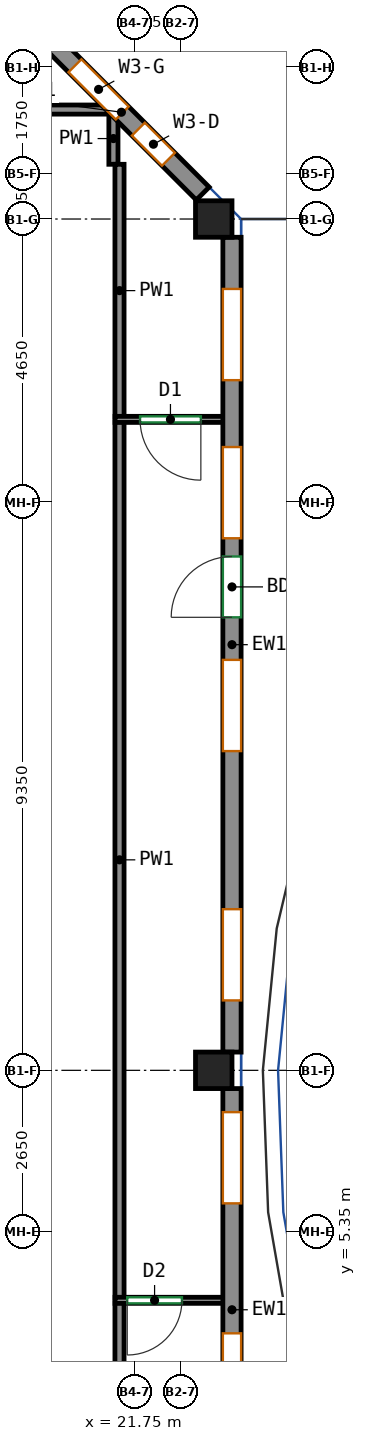
"""IFC4 building model, lengths in metres.
Left out: names, types, materials, properties, quantities, classifications, styles, units other than length and angle.
Written with IfcOpenShell. Run it as: python <this file> out.ifc"""

import sys

from ifc_helpers import new_model, si_unit, direction, frame, frame_2d, origin, origin_2d, place, context, subcontext, project, spatial, rectangle, extrude, source, transform, mapped, element, fill, save


model = new_model("IFC4")
c1 = context("Model", 3, precision=1e-05, world=origin(), true_north=direction((0.0, 1.0)))
c2 = subcontext(c1, "Body", "Model", "MODEL_VIEW")
j1 = project(units=[si_unit("LENGTHUNIT", "METRE"), si_unit("PLANEANGLEUNIT", "RADIAN")], contexts=[c1])
p1 = place(None, origin())
s1 = spatial("IfcSite", under=j1, at=p1, CompositionType="ELEMENT")
p2 = place(p1, origin())
s2 = spatial("IfcBuilding", under=s1, at=p2, CompositionType="ELEMENT")
p3 = place(p2, frame((0.0, 0.0, 315.4)))
s3 = spatial("IfcBuildingStorey", under=s2, at=p3, CompositionType="ELEMENT", Elevation=315.4)
m1 = source(origin(), c2, "Body", "SweptSolid", [
    extrude(rectangle(XDim=0.6, YDim=0.6, at=origin_2d()), origin(), (0.0, 0.0, 1.0), 3.0),
])
for number, where, z_axis, x_axis in (
    (1, (23.05, 8.0, 0.0), (0.0, 0.0, 1.0), (1.0, 0.0, 0.0)),
    (2, (23.05, 22.0, 0.0), (0.0, 0.0, 1.0), (1.0, 0.0, 0.0)),
):
    element("IfcColumn", number, at=place(p3, frame(where, z_axis=z_axis, x_axis=x_axis)), inside=s3, PredefinedType="COLUMN", context=c2, shape_type="MappedRepresentation", body=[
        mapped(m1, transform((0.0, 0.0, 0.0))),
    ])
m2 = source(origin(), c2, "Body", "SweptSolid", [
    extrude(rectangle(XDim=7.275, YDim=0.3, at=frame_2d((3.637, 0.0))), origin(), (0.0, 0.0, 1.0), 3.0),
])
p4 = place(p3, frame((23.35, 0.425, 0.0), z_axis=(0.0, 0.0, 1.0), x_axis=(0.0, 1.0, 0.0)))
e3 = element("IfcWall", 3, at=p4, inside=s3, PredefinedType="SOLIDWALL", context=c2, shape_type="MappedRepresentation", body=[
    mapped(m2, transform((0.0, 0.0, 0.0))),
])
p5 = place(p4, frame((1.75, 0.0, 0.8)))
e4 = element("IfcOpeningElement", 4, at=p5, cuts=e3, PredefinedType="OPENING", context=c2, shape_type="SweptSolid", body=[
    extrude(rectangle(XDim=1.5, YDim=2.05, at=frame_2d((0.75, 1.025))), frame((0.0, 0.16, 0.0), z_axis=(0.0, -1.0, 0.0), x_axis=(1.0, 0.0, 0.0)), (0.0, 0.0, 1.0), 0.32),
])
p6 = place(p4, frame((0.45, 0.0, 0.0)))
e5 = element("IfcOpeningElement", 5, at=p6, cuts=e3, PredefinedType="OPENING", context=c2, shape_type="SweptSolid", body=[
    extrude(rectangle(XDim=1.0, YDim=2.1, at=frame_2d((0.5, 1.05))), frame((0.0, 0.16, 0.0), z_axis=(0.0, -1.0, 0.0), x_axis=(1.0, 0.0, 0.0)), (0.0, 0.0, 1.0), 0.32),
])
p7 = place(p4, frame((5.387, 0.0, 0.8)))
e6 = element("IfcOpeningElement", 6, at=p7, cuts=e3, PredefinedType="OPENING", context=c2, shape_type="SweptSolid", body=[
    extrude(rectangle(XDim=1.5, YDim=2.05, at=frame_2d((0.75, 1.025))), frame((0.0, 0.16, 0.0), z_axis=(0.0, -1.0, 0.0), x_axis=(1.0, 0.0, 0.0)), (0.0, 0.0, 1.0), 0.32),
])
m3 = source(origin(), c2, "Body", "SweptSolid", [
    extrude(rectangle(XDim=13.4, YDim=0.3, at=frame_2d((6.7, 0.0))), origin(), (0.0, 0.0, 1.0), 3.0),
])
p8 = place(p3, frame((23.35, 8.3, 0.0), z_axis=(0.0, 0.0, 1.0), x_axis=(0.0, 1.0, 0.0)))
e7 = element("IfcWall", 7, at=p8, inside=s3, PredefinedType="SOLIDWALL", context=c2, shape_type="MappedRepresentation", body=[
    mapped(m3, transform((0.0, 0.0, 0.0))),
])
p9 = place(p8, frame((0.85, 0.0, 0.8)))
e8 = element("IfcOpeningElement", 8, at=p9, cuts=e7, PredefinedType="OPENING", context=c2, shape_type="SweptSolid", body=[
    extrude(rectangle(XDim=1.5, YDim=2.05, at=frame_2d((0.75, 1.025))), frame((0.0, 0.16, 0.0), z_axis=(0.0, -1.0, 0.0), x_axis=(1.0, 0.0, 0.0)), (0.0, 0.0, 1.0), 0.32),
])
p10 = place(p8, frame((4.95, 0.0, 0.8)))
e9 = element("IfcOpeningElement", 9, at=p10, cuts=e7, PredefinedType="OPENING", context=c2, shape_type="SweptSolid", body=[
    extrude(rectangle(XDim=1.5, YDim=2.05, at=frame_2d((0.75, 1.025))), frame((0.0, 0.16, 0.0), z_axis=(0.0, -1.0, 0.0), x_axis=(1.0, 0.0, 0.0)), (0.0, 0.0, 1.0), 0.32),
])
p11 = place(p8, frame((8.45, 0.0, 0.8)))
e10 = element("IfcOpeningElement", 10, at=p11, cuts=e7, PredefinedType="OPENING", context=c2, shape_type="SweptSolid", body=[
    extrude(rectangle(XDim=1.5, YDim=2.05, at=frame_2d((0.75, 1.025))), frame((0.0, 0.16, 0.0), z_axis=(0.0, -1.0, 0.0), x_axis=(1.0, 0.0, 0.0)), (0.0, 0.0, 1.0), 0.32),
])
p12 = place(p8, frame((7.15, 0.0, 0.0)))
e11 = element("IfcOpeningElement", 11, at=p12, cuts=e7, PredefinedType="OPENING", context=c2, shape_type="SweptSolid", body=[
    extrude(rectangle(XDim=1.0, YDim=2.1, at=frame_2d((0.5, 1.05))), frame((0.0, 0.16, 0.0), z_axis=(0.0, -1.0, 0.0), x_axis=(1.0, 0.0, 0.0)), (0.0, 0.0, 1.0), 0.32),
])
p13 = place(p8, frame((11.05, 0.0, 0.8)))
e12 = element("IfcOpeningElement", 12, at=p13, cuts=e7, PredefinedType="OPENING", context=c2, shape_type="SweptSolid", body=[
    extrude(rectangle(XDim=1.5, YDim=2.05, at=frame_2d((0.75, 1.025))), frame((0.0, 0.16, 0.0), z_axis=(0.0, -1.0, 0.0), x_axis=(1.0, 0.0, 0.0)), (0.0, 0.0, 1.0), 0.32),
])
m4 = source(origin(), c2, "Body", "SweptSolid", [
    extrude(rectangle(XDim=3.783, YDim=0.3, at=frame_2d((1.892, 0.0))), origin(), (0.0, 0.0, 1.0), 3.0),
])
p14 = place(p3, frame((22.869, 22.419, 0.0), z_axis=(0.0, 0.0, 1.0), x_axis=(-0.707106781187, 0.707106781187, 0.0)))
e13 = element("IfcWall", 13, at=p14, inside=s3, PredefinedType="SOLIDWALL", context=c2, shape_type="MappedRepresentation", body=[
    mapped(m4, transform((0.0, 0.0, 0.0))),
])
p15 = place(p14, frame((0.797, 0.0, 0.8)))
e14 = element("IfcOpeningElement", 14, at=p15, cuts=e13, PredefinedType="OPENING", context=c2, shape_type="SweptSolid", body=[
    extrude(rectangle(XDim=0.7, YDim=2.05, at=frame_2d((0.35, 1.025))), frame((0.0, 0.16, 0.0), z_axis=(0.0, -1.0, 0.0), x_axis=(1.0, 0.0, 0.0)), (0.0, 0.0, 1.0), 0.32),
])
p16 = place(p14, frame((1.872, 0.0, 0.8)))
e15 = element("IfcOpeningElement", 15, at=p16, cuts=e13, PredefinedType="OPENING", context=c2, shape_type="SweptSolid", body=[
    extrude(rectangle(XDim=1.1, YDim=2.05, at=frame_2d((0.55, 1.025))), frame((0.0, 0.16, 0.0), z_axis=(0.0, -1.0, 0.0), x_axis=(1.0, 0.0, 0.0)), (0.0, 0.0, 1.0), 0.32),
])
p17 = place(p3, frame((21.5, -2.671, 0.0), z_axis=(0.0, 0.0, 1.0), x_axis=(0.0, 1.0, 0.0)))
e16 = element("IfcWall", 16, at=p17, inside=s3, PredefinedType="PARTITIONING", context=c2, shape_type="SweptSolid", body=[
    extrude(rectangle(XDim=6.849, YDim=0.15, at=frame_2d((3.424, 0.0))), origin(), (0.0, 0.0, 1.0), 3.0),
])
p18 = place(p3, frame((21.5, 4.258, 0.0), z_axis=(0.0, 0.0, 1.0), x_axis=(0.0, 1.0, 0.0)))
e17 = element("IfcWall", 17, at=p18, inside=s3, PredefinedType="PARTITIONING", context=c2, shape_type="SweptSolid", body=[
    extrude(rectangle(XDim=14.407, YDim=0.15, at=frame_2d((7.204, 0.0))), origin(), (0.0, 0.0, 1.0), 3.0),
])
p19 = place(p3, frame((21.4, 22.9, 0.0), z_axis=(0.0, 0.0, 1.0), x_axis=(0.0, 1.0, 0.0)))
e18 = element("IfcWall", 18, at=p19, inside=s3, PredefinedType="PARTITIONING", context=c2, shape_type="SweptSolid", body=[
    extrude(rectangle(XDim=0.846, YDim=0.15, at=frame_2d((0.423, 0.0))), origin(), (0.0, 0.0, 1.0), 3.0),
])
p20 = place(p3, frame((21.5, 18.745, 0.0), z_axis=(0.0, 0.0, 1.0), x_axis=(0.0, 1.0, 0.0)))
e19 = element("IfcWall", 19, at=p20, inside=s3, PredefinedType="PARTITIONING", context=c2, shape_type="SweptSolid", body=[
    extrude(rectangle(XDim=4.155, YDim=0.15, at=frame_2d((2.077, 0.0))), origin(), (0.0, 0.0, 1.0), 3.0),
])
p21 = place(p3, frame((-19.675, 23.8, 0.0), z_axis=(0.0, 0.0, 1.0), x_axis=(1.0, 0.0, 0.0)))
e20 = element("IfcWall", 20, at=p21, inside=s3, PredefinedType="PARTITIONING", context=c2, shape_type="SweptSolid", body=[
    extrude(rectangle(XDim=41.021, YDim=0.15, at=frame_2d((20.51, 0.0))), origin(), (0.0, 0.0, 1.0), 3.0),
])
p22 = place(p21, frame((5.01, 0.0, 0.0)))
e21 = element("IfcOpeningElement", 21, at=p22, cuts=e20, PredefinedType="OPENING", context=c2, shape_type="SweptSolid", body=[
    extrude(rectangle(XDim=0.9, YDim=2.1, at=frame_2d((0.45, 1.05))), frame((0.0, 0.085, 0.0), z_axis=(0.0, -1.0, 0.0), x_axis=(1.0, 0.0, 0.0)), (0.0, 0.0, 1.0), 0.17),
])
p23 = place(p21, frame((26.417, 0.0, 0.0)))
e22 = element("IfcOpeningElement", 22, at=p23, cuts=e20, PredefinedType="OPENING", context=c2, shape_type="SweptSolid", body=[
    extrude(rectangle(XDim=0.9, YDim=2.1, at=frame_2d((0.45, 1.05))), frame((0.0, 0.085, 0.0), z_axis=(0.0, -1.0, 0.0), x_axis=(1.0, 0.0, 0.0)), (0.0, 0.0, 1.0), 0.17),
])
p24 = place(p3, frame((23.25, 4.218, 0.0), z_axis=(0.0, 0.0, 1.0), x_axis=(-1.0, 0.0, 0.0)))
e23 = element("IfcWall", 23, at=p24, inside=s3, PredefinedType="PARTITIONING", context=c2, shape_type="SweptSolid", body=[
    extrude(rectangle(XDim=1.823, YDim=0.1, at=frame_2d((0.912, 0.0))), origin(), (0.0, 0.0, 1.0), 3.0),
])
p25 = place(p24, frame((0.723, 0.0, 0.0)))
e24 = element("IfcOpeningElement", 24, at=p25, cuts=e23, PredefinedType="OPENING", context=c2, shape_type="SweptSolid", body=[
    extrude(rectangle(XDim=0.9, YDim=2.1, at=frame_2d((0.45, 1.05))), frame((0.0, 0.06, 0.0), z_axis=(0.0, -1.0, 0.0), x_axis=(1.0, 0.0, 0.0)), (0.0, 0.0, 1.0), 0.12),
])
p26 = place(p3, frame((23.25, 18.705, 0.0), z_axis=(0.0, 0.0, 1.0), x_axis=(-1.0, 0.0, 0.0)))
e25 = element("IfcWall", 25, at=p26, inside=s3, PredefinedType="PARTITIONING", context=c2, shape_type="SweptSolid", body=[
    extrude(rectangle(XDim=1.823, YDim=0.1, at=frame_2d((0.912, 0.0))), origin(), (0.0, 0.0, 1.0), 3.0),
])
p27 = place(p26, frame((0.412, 0.0, 0.0)))
e26 = element("IfcOpeningElement", 26, at=p27, cuts=e25, PredefinedType="OPENING", context=c2, shape_type="SweptSolid", body=[
    extrude(rectangle(XDim=1.0, YDim=2.1, at=frame_2d((0.5, 1.05))), frame((0.0, 0.06, 0.0), z_axis=(0.0, -1.0, 0.0), x_axis=(1.0, 0.0, 0.0)), (0.0, 0.0, 1.0), 0.12),
])
p28 = place(p5, origin())
e27 = element("IfcWindow", 27, at=p28, inside=s3, PartitioningType="SINGLE_PANEL", PredefinedType="WINDOW", context=c2, shape_type="SweptSolid", body=[
    extrude(rectangle(XDim=1.5, YDim=2.05, at=frame_2d((0.75, 1.025))), frame((0.0, 0.03, 0.0), z_axis=(0.0, -1.0, 0.0), x_axis=(1.0, 0.0, 0.0)), (0.0, 0.0, 1.0), 0.06),
])
fill(e4, e27)
p29 = place(p7, origin())
e28 = element("IfcWindow", 28, at=p29, inside=s3, PartitioningType="SINGLE_PANEL", PredefinedType="WINDOW", context=c2, shape_type="SweptSolid", body=[
    extrude(rectangle(XDim=1.5, YDim=2.05, at=frame_2d((0.75, 1.025))), frame((0.0, 0.03, 0.0), z_axis=(0.0, -1.0, 0.0), x_axis=(1.0, 0.0, 0.0)), (0.0, 0.0, 1.0), 0.06),
])
fill(e6, e28)
p30 = place(p9, origin())
e29 = element("IfcWindow", 29, at=p30, inside=s3, PartitioningType="SINGLE_PANEL", PredefinedType="WINDOW", context=c2, shape_type="SweptSolid", body=[
    extrude(rectangle(XDim=1.5, YDim=2.05, at=frame_2d((0.75, 1.025))), frame((0.0, 0.03, 0.0), z_axis=(0.0, -1.0, 0.0), x_axis=(1.0, 0.0, 0.0)), (0.0, 0.0, 1.0), 0.06),
])
fill(e8, e29)
p31 = place(p10, origin())
e30 = element("IfcWindow", 30, at=p31, inside=s3, PartitioningType="SINGLE_PANEL", PredefinedType="WINDOW", context=c2, shape_type="SweptSolid", body=[
    extrude(rectangle(XDim=1.5, YDim=2.05, at=frame_2d((0.75, 1.025))), frame((0.0, 0.03, 0.0), z_axis=(0.0, -1.0, 0.0), x_axis=(1.0, 0.0, 0.0)), (0.0, 0.0, 1.0), 0.06),
])
fill(e9, e30)
p32 = place(p11, origin())
e31 = element("IfcWindow", 31, at=p32, inside=s3, PartitioningType="SINGLE_PANEL", PredefinedType="WINDOW", context=c2, shape_type="SweptSolid", body=[
    extrude(rectangle(XDim=1.5, YDim=2.05, at=frame_2d((0.75, 1.025))), frame((0.0, 0.03, 0.0), z_axis=(0.0, -1.0, 0.0), x_axis=(1.0, 0.0, 0.0)), (0.0, 0.0, 1.0), 0.06),
])
fill(e10, e31)
p33 = place(p12, origin())
e32 = element("IfcDoor", 32, at=p33, inside=s3, OperationType="SINGLE_SWING_LEFT", PredefinedType="DOOR", context=c2, shape_type="SweptSolid", body=[
    extrude(rectangle(XDim=1.0, YDim=2.1, at=frame_2d((0.5, 1.05))), frame((0.0, 0.025, 0.0), z_axis=(0.0, -1.0, 0.0), x_axis=(1.0, 0.0, 0.0)), (0.0, 0.0, 1.0), 0.05),
])
fill(e11, e32)
p34 = place(p13, origin())
e33 = element("IfcWindow", 33, at=p34, inside=s3, PartitioningType="SINGLE_PANEL", PredefinedType="WINDOW", context=c2, shape_type="SweptSolid", body=[
    extrude(rectangle(XDim=1.5, YDim=2.05, at=frame_2d((0.75, 1.025))), frame((0.0, 0.03, 0.0), z_axis=(0.0, -1.0, 0.0), x_axis=(1.0, 0.0, 0.0)), (0.0, 0.0, 1.0), 0.06),
])
fill(e12, e33)
p35 = place(p15, origin())
e34 = element("IfcWindow", 34, at=p35, inside=s3, PartitioningType="SINGLE_PANEL", PredefinedType="WINDOW", context=c2, shape_type="SweptSolid", body=[
    extrude(rectangle(XDim=0.7, YDim=2.05, at=frame_2d((0.35, 1.025))), frame((0.0, 0.03, 0.0), z_axis=(0.0, -1.0, 0.0), x_axis=(1.0, 0.0, 0.0)), (0.0, 0.0, 1.0), 0.06),
])
fill(e14, e34)
p36 = place(p25, origin())
e35 = element("IfcDoor", 35, at=p36, inside=s3, OperationType="SINGLE_SWING_RIGHT", PredefinedType="DOOR", context=c2, shape_type="SweptSolid", body=[
    extrude(rectangle(XDim=0.9, YDim=2.1, at=frame_2d((0.45, 1.05))), frame((0.0, 0.025, 0.0), z_axis=(0.0, -1.0, 0.0), x_axis=(1.0, 0.0, 0.0)), (0.0, 0.0, 1.0), 0.05),
])
fill(e24, e35)
p37 = place(p27, origin())
e36 = element("IfcDoor", 36, at=p37, inside=s3, OperationType="SINGLE_SWING_LEFT", PredefinedType="DOOR", context=c2, shape_type="SweptSolid", body=[
    extrude(rectangle(XDim=1.0, YDim=2.1, at=frame_2d((0.5, 1.05))), frame((0.0, 0.025, 0.0), z_axis=(0.0, -1.0, 0.0), x_axis=(1.0, 0.0, 0.0)), (0.0, 0.0, 1.0), 0.05),
])
fill(e26, e36)
p38 = place(p16, origin())
e37 = element("IfcWindow", 37, at=p38, inside=s3, PartitioningType="SINGLE_PANEL", PredefinedType="WINDOW", context=c2, shape_type="SweptSolid", body=[
    extrude(rectangle(XDim=1.1, YDim=2.05, at=frame_2d((0.55, 1.025))), frame((0.0, 0.03, 0.0), z_axis=(0.0, -1.0, 0.0), x_axis=(1.0, 0.0, 0.0)), (0.0, 0.0, 1.0), 0.06),
])
fill(e15, e37)
save(model, sys.argv[1])
